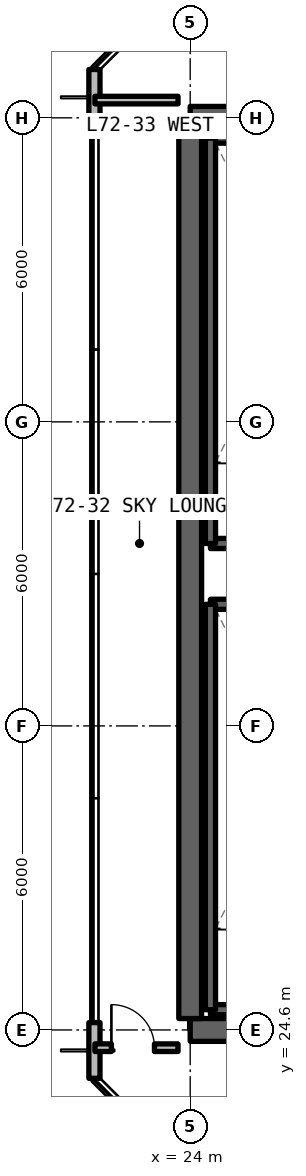
"""IFC4 building model, lengths in metres.
Left out: names, types, materials, properties, quantities, classifications, styles, units other than length and angle.
Written with IfcOpenShell. Run it as: python <this file> out.ifc"""

import sys

from ifc_helpers import new_model, si_unit, direction, frame, frame_2d, origin, place, context, subcontext, project, spatial, rectangle, extrude, element, fill, save


model = new_model("IFC4")
c1 = context("Model", 3, precision=1e-05, world=origin(), true_north=direction((0.0, 1.0)))
c2 = subcontext(c1, "Body", "Model", "MODEL_VIEW")
j1 = project(units=[si_unit("LENGTHUNIT", "METRE"), si_unit("PLANEANGLEUNIT", "RADIAN")], contexts=[c1])
p1 = place(None, origin())
s1 = spatial("IfcSite", under=j1, at=p1, CompositionType="ELEMENT")
p2 = place(p1, origin())
s2 = spatial("IfcBuilding", under=s1, at=p2, CompositionType="ELEMENT")
p3 = place(p2, frame((0.0, 0.0, 257.07)))
s3 = spatial("IfcBuildingStorey", under=s2, at=p3, CompositionType="ELEMENT", Elevation=257.07)
p4 = place(p3, frame((24.0, 24.6, 0.0), z_axis=(0.0, 0.0, 1.0), x_axis=(1.0, 0.0, 0.0)))
e1 = element("IfcWall", 1, at=p4, inside=s3, PredefinedType="SHEAR", context=c2, shape_type="SweptSolid", body=[
    extrude(rectangle(XDim=12.0, YDim=0.45, at=frame_2d((6.0, 0.0))), origin(), (0.0, 0.0, 1.0), 3.37),
])
p5 = place(p4, frame((7.2, 0.0, 0.0)))
e2 = element("IfcOpeningElement", 2, at=p5, cuts=e1, PredefinedType="OPENING", context=c2, shape_type="SweptSolid", body=[
    extrude(rectangle(XDim=1.0, YDim=2.15, at=frame_2d((0.5, 1.075))), frame((0.0, 0.235, 0.0), z_axis=(0.0, -1.0, 0.0), x_axis=(1.0, 0.0, 0.0)), (0.0, 0.0, 1.0), 0.47),
])
p6 = place(p3, frame((36.0, 42.6, 0.0), z_axis=(0.0, 0.0, 1.0), x_axis=(-1.0, 0.0, 0.0)))
e3 = element("IfcWall", 3, at=p6, inside=s3, PredefinedType="SHEAR", context=c2, shape_type="SweptSolid", body=[
    extrude(rectangle(XDim=12.0, YDim=0.45, at=frame_2d((6.0, 0.0))), origin(), (0.0, 0.0, 1.0), 3.37),
])
p7 = place(p6, frame((3.8, 0.0, 0.0)))
e4 = element("IfcOpeningElement", 4, at=p7, cuts=e3, PredefinedType="OPENING", context=c2, shape_type="SweptSolid", body=[
    extrude(rectangle(XDim=1.0, YDim=2.15, at=frame_2d((0.5, 1.075))), frame((0.0, 0.235, 0.0), z_axis=(0.0, -1.0, 0.0), x_axis=(1.0, 0.0, 0.0)), (0.0, 0.0, 1.0), 0.47),
])
p8 = place(p3, frame((24.0, 24.825, 0.0), z_axis=(0.0, 0.0, 1.0), x_axis=(0.0, 1.0, 0.0)))
e5 = element("IfcWall", 5, at=p8, inside=s3, PredefinedType="SHEAR", context=c2, shape_type="SweptSolid", body=[
    extrude(rectangle(XDim=17.55, YDim=0.45, at=frame_2d((8.775, 0.0))), origin(), (0.0, 0.0, 1.0), 3.37),
])
for number, where, z_axis, x_axis in (
    (6, (22.11, 43.554, 0.0), (0.0, 0.0, 1.0), (0.0, -1.0, 0.0)),
    (7, (22.11, 24.746, 0.0), (0.0, 0.0, 1.0), (0.0, -1.0, 0.0)),
):
    element("IfcWall", number, at=place(p3, frame(where, z_axis=z_axis, x_axis=x_axis)), inside=s3, PredefinedType="SOLIDWALL", context=c2, shape_type="SweptSolid", body=[
        extrude(rectangle(XDim=1.1, YDim=0.22, at=frame_2d((0.55, 0.0))), origin(), (0.0, 0.0, 1.0), 3.41),
    ])
p9 = place(p3, frame((22.12, 24.25, 0.0), z_axis=(0.0, 0.0, 1.0), x_axis=(1.0, 0.0, 0.0)))
e8 = element("IfcWall", 8, at=p9, inside=s3, PredefinedType="SOLIDWALL", context=c2, shape_type="SweptSolid", body=[
    extrude(rectangle(XDim=1.64, YDim=0.15, at=frame_2d((0.82, 0.0))), origin(), (0.0, 0.0, 1.0), 2.63),
])
p10 = place(p9, frame((0.325, 0.0, 0.0)))
e9 = element("IfcOpeningElement", 9, at=p10, cuts=e8, PredefinedType="OPENING", context=c2, shape_type="SweptSolid", body=[
    extrude(rectangle(XDim=0.85, YDim=2.1, at=frame_2d((0.425, 1.05))), frame((0.0, 0.085, 0.0), z_axis=(0.0, -1.0, 0.0), x_axis=(1.0, 0.0, 0.0)), (0.0, 0.0, 1.0), 0.17),
])
p11 = place(p3, frame((22.12, 42.95, 0.0), z_axis=(0.0, 0.0, 1.0), x_axis=(1.0, 0.0, 0.0)))
e10 = element("IfcWall", 10, at=p11, inside=s3, PredefinedType="SOLIDWALL", context=c2, shape_type="SweptSolid", body=[
    extrude(rectangle(XDim=1.64, YDim=0.15, at=frame_2d((0.82, 0.0))), origin(), (0.0, 0.0, 1.0), 2.63),
])
for number, where, z_axis, x_axis in (
    (11, (24.4, 25.0, 0.0), (0.0, 0.0, 1.0), (1.0, 0.0, 0.0)),
    (12, (27.8, 33.0, 0.0), (0.0, 0.0, 1.0), (-1.0, 0.0, 0.0)),
):
    element("IfcWall", number, at=place(p3, frame(where, z_axis=z_axis, x_axis=x_axis)), inside=s3, PredefinedType="SOLIDWALL", context=c2, shape_type="SweptSolid", body=[
        extrude(rectangle(XDim=3.4, YDim=0.2, at=frame_2d((1.7, 0.0))), origin(), (0.0, 0.0, 1.0), 3.63),
    ])
p12 = place(p3, frame((24.4, 33.0, 0.0), z_axis=(0.0, 0.0, 1.0), x_axis=(0.0, -1.0, 0.0)))
e13 = element("IfcWall", 13, at=p12, inside=s3, PredefinedType="SOLIDWALL", context=c2, shape_type="SweptSolid", body=[
    extrude(rectangle(XDim=8.0, YDim=0.2, at=frame_2d((4.0, 0.0))), origin(), (0.0, 0.0, 1.0), 3.63),
])
for number, where, z_axis, x_axis in (
    (14, (24.4, 34.2, 0.0), (0.0, 0.0, 1.0), (1.0, 0.0, 0.0)),
    (15, (27.8, 42.2, 0.0), (0.0, 0.0, 1.0), (-1.0, 0.0, 0.0)),
):
    element("IfcWall", number, at=place(p3, frame(where, z_axis=z_axis, x_axis=x_axis)), inside=s3, PredefinedType="SOLIDWALL", context=c2, shape_type="SweptSolid", body=[
        extrude(rectangle(XDim=3.4, YDim=0.2, at=frame_2d((1.7, 0.0))), origin(), (0.0, 0.0, 1.0), 3.63),
    ])
p13 = place(p3, frame((24.4, 42.2, 0.0), z_axis=(0.0, 0.0, 1.0), x_axis=(0.0, -1.0, 0.0)))
e16 = element("IfcWall", 16, at=p13, inside=s3, PredefinedType="SOLIDWALL", context=c2, shape_type="SweptSolid", body=[
    extrude(rectangle(XDim=8.0, YDim=0.2, at=frame_2d((4.0, 0.0))), origin(), (0.0, 0.0, 1.0), 3.63),
])
p14 = place(p10, origin())
e17 = element("IfcDoor", 17, at=p14, inside=s3, OperationType="SINGLE_SWING_LEFT", PredefinedType="DOOR", context=c2, shape_type="SweptSolid", body=[
    extrude(rectangle(XDim=0.85, YDim=2.1, at=frame_2d((0.425, 1.05))), frame((0.0, 0.025, 0.0), z_axis=(0.0, -1.0, 0.0), x_axis=(1.0, 0.0, 0.0)), (0.0, 0.0, 1.0), 0.05),
])
fill(e9, e17)
save(model, sys.argv[1])
